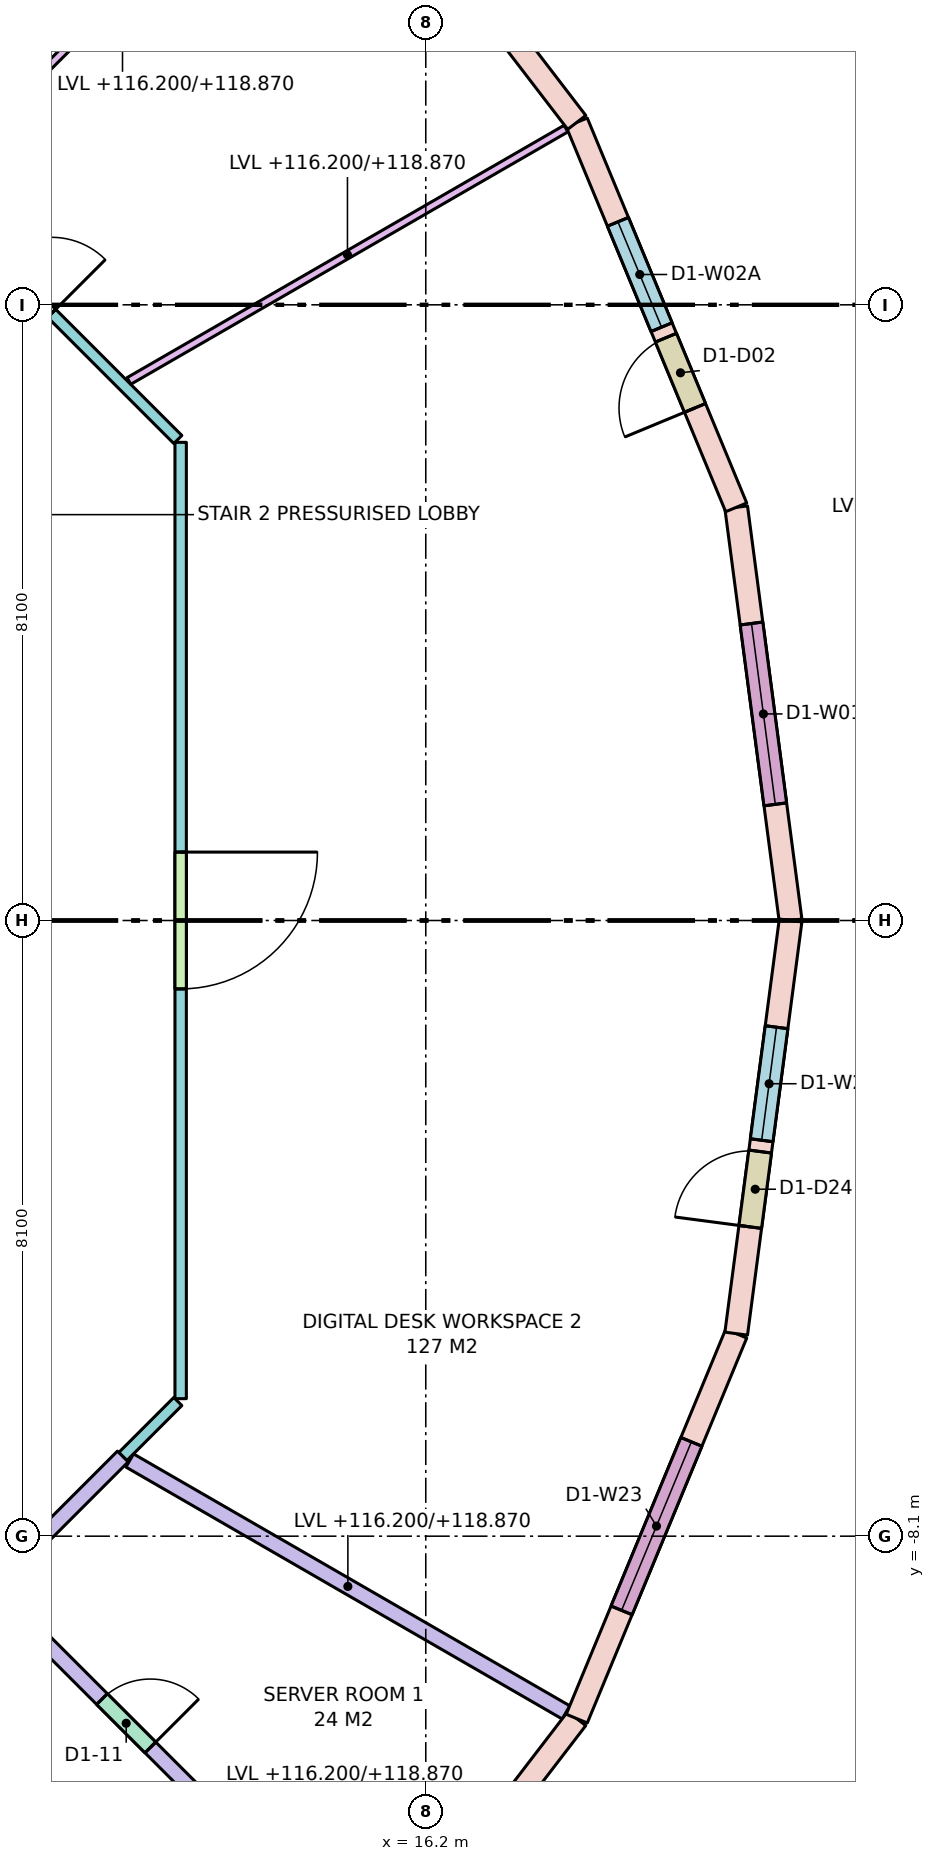
"""IFC4 building model, lengths in metres.
Left out: names, types, materials, properties, quantities, classifications, styles, units other than length and angle.
Written with IfcOpenShell. Run it as: python <this file> out.ifc"""

import sys

from ifc_helpers import new_model, si_unit, direction, frame, frame_2d, origin, place, context, subcontext, project, spatial, rectangle, extrude, element, fill, save


model = new_model("IFC4")
c1 = context("Model", 3, precision=1e-05, world=origin(), true_north=direction((0.0, 1.0)))
c2 = subcontext(c1, "Body", "Model", "MODEL_VIEW")
j1 = project(units=[si_unit("LENGTHUNIT", "METRE"), si_unit("PLANEANGLEUNIT", "RADIAN")], contexts=[c1])
p1 = place(None, origin())
s1 = spatial("IfcSite", under=j1, at=p1, CompositionType="ELEMENT")
p2 = place(p1, origin())
s2 = spatial("IfcBuilding", under=s1, at=p2, CompositionType="ELEMENT")
p3 = place(p2, frame((0.0, 0.0, 116.2)))
s3 = spatial("IfcBuildingStorey", under=s2, at=p3, CompositionType="ELEMENT", Elevation=116.2)
p4 = place(p3, frame((21.0, 0.0, 0.0), z_axis=(0.0, 0.0, 1.0), x_axis=(-0.130527087244, 0.991444743541, 0.0)))
e1 = element("IfcWall", 1, at=p4, inside=s3, PredefinedType="STANDARD", context=c2, shape_type="SweptSolid", body=[
    extrude(rectangle(XDim=5.482, YDim=0.3, at=frame_2d((2.741, 0.0))), origin(), (0.0, 0.0, 1.0), 3.52),
])
p5 = place(p4, frame((1.541, 0.0, 0.8)))
e2 = element("IfcOpeningElement", 2, at=p5, cuts=e1, PredefinedType="OPENING", context=c2, shape_type="SweptSolid", body=[
    extrude(rectangle(XDim=2.4, YDim=2.5, at=frame_2d((1.2, 1.25))), frame((0.0, 0.16, 0.0), z_axis=(0.0, -1.0, 0.0), x_axis=(1.0, 0.0, 0.0)), (0.0, 0.0, 1.0), 0.32),
])
p6 = place(p3, frame((20.284, 5.435, 0.0), z_axis=(0.0, 0.0, 1.0), x_axis=(-0.382688740813, 0.923877333662, 0.0)))
e3 = element("IfcWall", 3, at=p6, inside=s3, PredefinedType="STANDARD", context=c2, shape_type="SweptSolid", body=[
    extrude(rectangle(XDim=5.482, YDim=0.3, at=frame_2d((2.741, 0.0))), origin(), (0.0, 0.0, 1.0), 3.52),
])
p7 = place(p6, frame((1.416, 0.0, 0.0)))
e4 = element("IfcOpeningElement", 4, at=p7, cuts=e3, PredefinedType="OPENING", context=c2, shape_type="SweptSolid", body=[
    extrude(rectangle(XDim=1.0, YDim=2.4, at=frame_2d((0.5, 1.2))), frame((0.0, 0.16, 0.0), z_axis=(0.0, -1.0, 0.0), x_axis=(1.0, 0.0, 0.0)), (0.0, 0.0, 1.0), 0.32),
])
p8 = place(p6, frame((2.566, 0.0, 0.8)))
e5 = element("IfcOpeningElement", 5, at=p8, cuts=e3, PredefinedType="OPENING", context=c2, shape_type="SweptSolid", body=[
    extrude(rectangle(XDim=1.5, YDim=2.5, at=frame_2d((0.75, 1.25))), frame((0.0, 0.16, 0.0), z_axis=(0.0, -1.0, 0.0), x_axis=(1.0, 0.0, 0.0)), (0.0, 0.0, 1.0), 0.32),
])
p9 = place(p3, frame((18.187, 10.5, 0.0), z_axis=(0.0, 0.0, 1.0), x_axis=(-0.608784891166, 0.793335336593, 0.0)))
e6 = element("IfcWall", 6, at=p9, inside=s3, PredefinedType="STANDARD", context=c2, shape_type="SweptSolid", body=[
    extrude(rectangle(XDim=5.482, YDim=0.3, at=frame_2d((2.741, 0.0))), origin(), (0.0, 0.0, 1.0), 3.52),
])
p10 = place(p9, frame((1.541, 0.0, 0.8)))
e7 = element("IfcOpeningElement", 7, at=p10, cuts=e6, PredefinedType="OPENING", context=c2, shape_type="SweptSolid", body=[
    extrude(rectangle(XDim=2.4, YDim=2.5, at=frame_2d((1.2, 1.25))), frame((0.0, 0.16, 0.0), z_axis=(0.0, -1.0, 0.0), x_axis=(1.0, 0.0, 0.0)), (0.0, 0.0, 1.0), 0.32),
])
p11 = place(p3, frame((14.849, -14.849, 0.0), z_axis=(0.0, 0.0, 1.0), x_axis=(0.608784891166, 0.793335336593, 0.0)))
e8 = element("IfcWall", 8, at=p11, inside=s3, PredefinedType="STANDARD", context=c2, shape_type="SweptSolid", body=[
    extrude(rectangle(XDim=5.482, YDim=0.3, at=frame_2d((2.741, 0.0))), origin(), (0.0, 0.0, 1.0), 3.52),
])
p12 = place(p11, frame((1.416, 0.0, 0.0)))
e9 = element("IfcOpeningElement", 9, at=p12, cuts=e8, PredefinedType="OPENING", context=c2, shape_type="SweptSolid", body=[
    extrude(rectangle(XDim=1.0, YDim=2.4, at=frame_2d((0.5, 1.2))), frame((0.0, 0.16, 0.0), z_axis=(0.0, -1.0, 0.0), x_axis=(1.0, 0.0, 0.0)), (0.0, 0.0, 1.0), 0.32),
])
p13 = place(p11, frame((2.566, 0.0, 0.8)))
e10 = element("IfcOpeningElement", 10, at=p13, cuts=e8, PredefinedType="OPENING", context=c2, shape_type="SweptSolid", body=[
    extrude(rectangle(XDim=1.5, YDim=2.5, at=frame_2d((0.75, 1.25))), frame((0.0, 0.16, 0.0), z_axis=(0.0, -1.0, 0.0), x_axis=(1.0, 0.0, 0.0)), (0.0, 0.0, 1.0), 0.32),
])
p14 = place(p3, frame((18.187, -10.5, 0.0), z_axis=(0.0, 0.0, 1.0), x_axis=(0.382688740813, 0.923877333662, 0.0)))
e11 = element("IfcWall", 11, at=p14, inside=s3, PredefinedType="STANDARD", context=c2, shape_type="SweptSolid", body=[
    extrude(rectangle(XDim=5.482, YDim=0.3, at=frame_2d((2.741, 0.0))), origin(), (0.0, 0.0, 1.0), 3.52),
])
p15 = place(p14, frame((1.541, 0.0, 0.8)))
e12 = element("IfcOpeningElement", 12, at=p15, cuts=e11, PredefinedType="OPENING", context=c2, shape_type="SweptSolid", body=[
    extrude(rectangle(XDim=2.4, YDim=2.5, at=frame_2d((1.2, 1.25))), frame((0.0, 0.16, 0.0), z_axis=(0.0, -1.0, 0.0), x_axis=(1.0, 0.0, 0.0)), (0.0, 0.0, 1.0), 0.32),
])
p16 = place(p3, frame((20.284, -5.435, 0.0), z_axis=(0.0, 0.0, 1.0), x_axis=(0.130527087244, 0.991444743541, 0.0)))
e13 = element("IfcWall", 13, at=p16, inside=s3, PredefinedType="STANDARD", context=c2, shape_type="SweptSolid", body=[
    extrude(rectangle(XDim=5.482, YDim=0.3, at=frame_2d((2.741, 0.0))), origin(), (0.0, 0.0, 1.0), 3.52),
])
p17 = place(p16, frame((1.416, 0.0, 0.0)))
e14 = element("IfcOpeningElement", 14, at=p17, cuts=e13, PredefinedType="OPENING", context=c2, shape_type="SweptSolid", body=[
    extrude(rectangle(XDim=1.0, YDim=2.4, at=frame_2d((0.5, 1.2))), frame((0.0, 0.16, 0.0), z_axis=(0.0, -1.0, 0.0), x_axis=(1.0, 0.0, 0.0)), (0.0, 0.0, 1.0), 0.32),
])
p18 = place(p16, frame((2.566, 0.0, 0.8)))
e15 = element("IfcOpeningElement", 15, at=p18, cuts=e13, PredefinedType="OPENING", context=c2, shape_type="SweptSolid", body=[
    extrude(rectangle(XDim=1.5, YDim=2.5, at=frame_2d((0.75, 1.25))), frame((0.0, 0.16, 0.0), z_axis=(0.0, -1.0, 0.0), x_axis=(1.0, 0.0, 0.0)), (0.0, 0.0, 1.0), 0.32),
])
p19 = place(p3, frame((8.291, 10.975, 0.0), z_axis=(0.0, 0.0, 1.0), x_axis=(0.707088206597, -0.707125355289, 0.0)))
e16 = element("IfcWall", 16, at=p19, inside=s3, PredefinedType="PARTITIONING", context=c2, shape_type="SweptSolid", body=[
    extrude(rectangle(XDim=6.572, YDim=0.15, at=frame_2d((3.286, 0.0))), origin(), (0.0, 0.0, 1.0), 2.67),
])
p20 = place(p19, frame((3.224, 0.0, 0.0)))
e17 = element("IfcOpeningElement", 17, at=p20, cuts=e16, PredefinedType="OPENING", context=c2, shape_type="SweptSolid", body=[
    extrude(rectangle(XDim=1.0, YDim=2.1, at=frame_2d((0.5, 1.05))), frame((0.0, 0.085, 0.0), z_axis=(0.0, -1.0, 0.0), x_axis=(1.0, 0.0, 0.0)), (0.0, 0.0, 1.0), 0.17),
])
p21 = place(p3, frame((12.975, 6.291, 0.0), z_axis=(0.0, 0.0, 1.0), x_axis=(0.0, -1.0, 0.0)))
e18 = element("IfcWall", 18, at=p21, inside=s3, PredefinedType="PARTITIONING", context=c2, shape_type="SweptSolid", body=[
    extrude(rectangle(XDim=12.582, YDim=0.15, at=frame_2d((6.291, 0.0))), origin(), (0.0, 0.0, 1.0), 2.67),
])
p22 = place(p21, frame((5.391, 0.0, 0.0)))
e19 = element("IfcOpeningElement", 19, at=p22, cuts=e18, PredefinedType="OPENING", context=c2, shape_type="SweptSolid", body=[
    extrude(rectangle(XDim=1.8, YDim=2.1, at=frame_2d((0.9, 1.05))), frame((0.0, 0.085, 0.0), z_axis=(0.0, -1.0, 0.0), x_axis=(1.0, 0.0, 0.0)), (0.0, 0.0, 1.0), 0.17),
])
p23 = place(p3, frame((12.938, -6.328, 0.0), z_axis=(0.0, 0.0, 1.0), x_axis=(-0.707106781187, -0.707106781187, 0.0)))
e20 = element("IfcWall", 20, at=p23, inside=s3, PredefinedType="PARTITIONING", context=c2, shape_type="SweptSolid", body=[
    extrude(rectangle(XDim=1.024, YDim=0.15, at=frame_2d((0.512, 0.0))), origin(), (0.0, 0.0, 1.0), 2.67),
])
p24 = place(p3, frame((12.214, -7.052, 0.0), z_axis=(0.0, 0.0, 1.0), x_axis=(-0.707106781187, -0.707106781187, 0.0)))
e21 = element("IfcWall", 21, at=p24, inside=s3, PredefinedType="PARTITIONING", context=c2, shape_type="SweptSolid", body=[
    extrude(rectangle(XDim=2.35, YDim=0.2, at=frame_2d((1.175, 0.0))), origin(), (0.0, 0.0, 1.0), 2.67),
])
p25 = place(p3, frame((10.481, -8.784, 0.0), z_axis=(0.0, 0.0, 1.0), x_axis=(0.707106781187, -0.707106781187, 0.0)))
e22 = element("IfcWall", 22, at=p25, inside=s3, PredefinedType="PARTITIONING", context=c2, shape_type="SweptSolid", body=[
    extrude(rectangle(XDim=5.026, YDim=0.2, at=frame_2d((2.513, 0.0))), origin(), (0.0, 0.0, 1.0), 3.52),
])
p26 = place(p25, frame((2.063, 0.0, 0.0)))
e23 = element("IfcOpeningElement", 23, at=p26, cuts=e22, PredefinedType="OPENING", context=c2, shape_type="SweptSolid", body=[
    extrude(rectangle(XDim=0.9, YDim=2.1, at=frame_2d((0.45, 1.05))), frame((0.0, 0.11, 0.0), z_axis=(0.0, -1.0, 0.0), x_axis=(1.0, 0.0, 0.0)), (0.0, 0.0, 1.0), 0.22),
])
p27 = place(p3, frame((12.338, -14.035, 0.0), z_axis=(0.0, 0.0, 1.0), x_axis=(-0.707106781187, 0.707106781187, 0.0)))
e24 = element("IfcWall", 24, at=p27, inside=s3, PredefinedType="PARTITIONING", context=c2, shape_type="SweptSolid", body=[
    extrude(rectangle(XDim=5.026, YDim=0.15, at=frame_2d((2.513, 0.0))), origin(), (0.0, 0.0, 1.0), 3.52),
])
p28 = place(p27, frame((2.013, 0.0, 0.0)))
e25 = element("IfcOpeningElement", 25, at=p28, cuts=e24, PredefinedType="OPENING", context=c2, shape_type="SweptSolid", body=[
    extrude(rectangle(XDim=1.0, YDim=2.1, at=frame_2d((0.5, 1.05))), frame((0.0, 0.085, 0.0), z_axis=(0.0, -1.0, 0.0), x_axis=(1.0, 0.0, 0.0)), (0.0, 0.0, 1.0), 0.17),
])
p29 = place(p3, frame((12.294, 7.098, 0.0), z_axis=(0.0, 0.0, 1.0), x_axis=(0.866010486135, 0.500025837236, 0.0)))
e26 = element("IfcWall", 26, at=p29, inside=s3, PredefinedType="PARTITIONING", context=c2, shape_type="SweptSolid", body=[
    extrude(rectangle(XDim=6.641, YDim=0.1, at=frame_2d((3.32, 0.0))), origin(), (0.0, 0.0, 1.0), 2.67),
])
p30 = place(p3, frame((9.686, 9.686, 0.0), z_axis=(0.0, 0.0, 1.0), x_axis=(0.707106781187, 0.707106781187, 0.0)))
e27 = element("IfcWall", 27, at=p30, inside=s3, PredefinedType="PARTITIONING", context=c2, shape_type="SweptSolid", body=[
    extrude(rectangle(XDim=7.139, YDim=0.1, at=frame_2d((3.569, 0.0))), origin(), (0.0, 0.0, 1.0), 2.67),
])
p31 = place(p3, frame((12.305, -7.104, 0.0), z_axis=(0.0, 0.0, 1.0), x_axis=(0.866019973495, -0.500009405419, 0.0)))
e28 = element("IfcWall", 28, at=p31, inside=s3, PredefinedType="PARTITIONING", context=c2, shape_type="SweptSolid", body=[
    extrude(rectangle(XDim=6.628, YDim=0.2, at=frame_2d((3.314, 0.0))), origin(), (0.0, 0.0, 1.0), 2.67),
])
p32 = place(p5, origin())
e29 = element("IfcWindow", 29, at=p32, inside=s3, PartitioningType="SINGLE_PANEL", PredefinedType="WINDOW", context=c2, shape_type="SweptSolid", body=[
    extrude(rectangle(XDim=2.4, YDim=2.5, at=frame_2d((1.2, 1.25))), frame((0.0, 0.03, 0.0), z_axis=(0.0, -1.0, 0.0), x_axis=(1.0, 0.0, 0.0)), (0.0, 0.0, 1.0), 0.06),
])
fill(e2, e29)
p33 = place(p7, origin())
e30 = element("IfcDoor", 30, at=p33, inside=s3, OperationType="SINGLE_SWING_LEFT", PredefinedType="DOOR", context=c2, shape_type="SweptSolid", body=[
    extrude(rectangle(XDim=1.0, YDim=2.4, at=frame_2d((0.5, 1.2))), frame((0.0, 0.025, 0.0), z_axis=(0.0, -1.0, 0.0), x_axis=(1.0, 0.0, 0.0)), (0.0, 0.0, 1.0), 0.05),
])
fill(e4, e30)
p34 = place(p8, origin())
e31 = element("IfcWindow", 31, at=p34, inside=s3, PartitioningType="SINGLE_PANEL", PredefinedType="WINDOW", context=c2, shape_type="SweptSolid", body=[
    extrude(rectangle(XDim=1.5, YDim=2.5, at=frame_2d((0.75, 1.25))), frame((0.0, 0.03, 0.0), z_axis=(0.0, -1.0, 0.0), x_axis=(1.0, 0.0, 0.0)), (0.0, 0.0, 1.0), 0.06),
])
fill(e5, e31)
p35 = place(p15, origin())
e32 = element("IfcWindow", 32, at=p35, inside=s3, PartitioningType="SINGLE_PANEL", PredefinedType="WINDOW", context=c2, shape_type="SweptSolid", body=[
    extrude(rectangle(XDim=2.4, YDim=2.5, at=frame_2d((1.2, 1.25))), frame((0.0, 0.03, 0.0), z_axis=(0.0, -1.0, 0.0), x_axis=(1.0, 0.0, 0.0)), (0.0, 0.0, 1.0), 0.06),
])
fill(e12, e32)
p36 = place(p17, origin())
e33 = element("IfcDoor", 33, at=p36, inside=s3, OperationType="SINGLE_SWING_LEFT", PredefinedType="DOOR", context=c2, shape_type="SweptSolid", body=[
    extrude(rectangle(XDim=1.0, YDim=2.4, at=frame_2d((0.5, 1.2))), frame((0.0, 0.025, 0.0), z_axis=(0.0, -1.0, 0.0), x_axis=(1.0, 0.0, 0.0)), (0.0, 0.0, 1.0), 0.05),
])
fill(e14, e33)
p37 = place(p18, origin())
e34 = element("IfcWindow", 34, at=p37, inside=s3, PartitioningType="SINGLE_PANEL", PredefinedType="WINDOW", context=c2, shape_type="SweptSolid", body=[
    extrude(rectangle(XDim=1.5, YDim=2.5, at=frame_2d((0.75, 1.25))), frame((0.0, 0.03, 0.0), z_axis=(0.0, -1.0, 0.0), x_axis=(1.0, 0.0, 0.0)), (0.0, 0.0, 1.0), 0.06),
])
fill(e15, e34)
p38 = place(p26, origin())
e35 = element("IfcDoor", 35, at=p38, inside=s3, OperationType="SINGLE_SWING_RIGHT", PredefinedType="DOOR", context=c2, shape_type="SweptSolid", body=[
    extrude(rectangle(XDim=0.9, YDim=2.1, at=frame_2d((0.45, 1.05))), frame((0.0, 0.025, 0.0), z_axis=(0.0, -1.0, 0.0), x_axis=(1.0, 0.0, 0.0)), (0.0, 0.0, 1.0), 0.05),
])
fill(e23, e35)
p39 = place(p22, origin())
e36 = element("IfcDoor", 36, at=p39, inside=s3, OperationType="DOUBLE_DOOR_SINGLE_SWING", PredefinedType="DOOR", context=c2, shape_type="SweptSolid", body=[
    extrude(rectangle(XDim=1.8, YDim=2.1, at=frame_2d((0.9, 1.05))), frame((0.0, 0.025, 0.0), z_axis=(0.0, -1.0, 0.0), x_axis=(1.0, 0.0, 0.0)), (0.0, 0.0, 1.0), 0.05),
])
fill(e19, e36)
p40 = place(p20, origin())
e37 = element("IfcDoor", 37, at=p40, inside=s3, OperationType="SINGLE_SWING_RIGHT", PredefinedType="DOOR", context=c2, shape_type="SweptSolid", body=[
    extrude(rectangle(XDim=1.0, YDim=2.1, at=frame_2d((0.5, 1.05))), frame((0.0, 0.025, 0.0), z_axis=(0.0, -1.0, 0.0), x_axis=(1.0, 0.0, 0.0)), (0.0, 0.0, 1.0), 0.05),
])
fill(e17, e37)
save(model, sys.argv[1])
